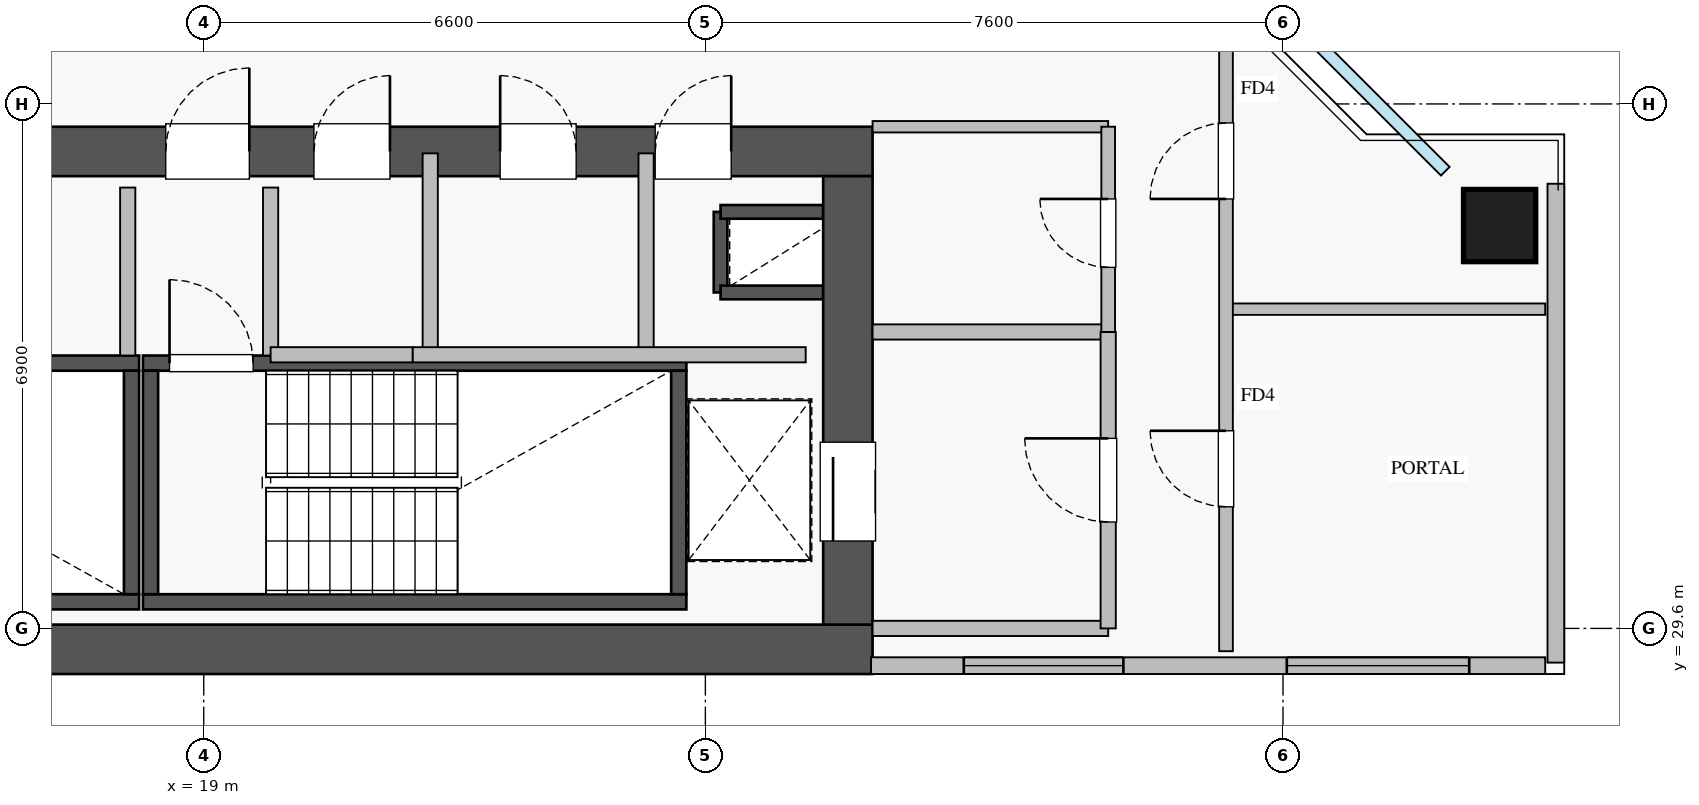
"""IFC4 building model, lengths in metres.
Left out: names, types, materials, properties, quantities, classifications, styles, units other than length and angle.
Written with IfcOpenShell. Run it as: python <this file> out.ifc"""

import sys

from ifc_helpers import new_model, si_unit, direction, frame, frame_2d, origin, origin_2d, place, context, subcontext, project, spatial, rectangle, extrude, source, transform, mapped, element, fill, save


model = new_model("IFC4")
c1 = context("Model", 3, precision=1e-05, world=origin(), true_north=direction((0.0, 1.0)))
c2 = subcontext(c1, "Body", "Model", "MODEL_VIEW")
j1 = project(units=[si_unit("LENGTHUNIT", "METRE"), si_unit("PLANEANGLEUNIT", "RADIAN")], contexts=[c1])
p1 = place(None, origin())
s1 = spatial("IfcSite", under=j1, at=p1, CompositionType="ELEMENT")
p2 = place(p1, origin())
s2 = spatial("IfcBuilding", under=s1, at=p2, CompositionType="ELEMENT")
p3 = place(p2, frame((0.0, 0.0, 169.75)))
s3 = spatial("IfcBuildingStorey", under=s2, at=p3, CompositionType="ELEMENT", Elevation=169.75)
p4 = place(p3, frame((25.8, 34.02, 0.0), z_axis=(0.0, 0.0, 1.0), x_axis=(0.0, 1.0, 0.0)))
e1 = element("IfcWall", 1, at=p4, inside=s3, PredefinedType="SHEAR", context=c2, shape_type="SweptSolid", body=[
    extrude(rectangle(XDim=1.06, YDim=0.18, at=frame_2d((0.53, 0.0))), origin(), (0.0, 0.0, 1.0), 3.0),
])
for number, where, z_axis, x_axis in (
    (2, (25.8, 35.08, 0.0), (0.0, 0.0, 1.0), (1.0, 0.0, 0.0)),
    (3, (25.8, 34.02, 0.0), (0.0, 0.0, 1.0), (1.0, 0.0, 0.0)),
):
    element("IfcWall", number, at=place(p3, frame(where, z_axis=z_axis, x_axis=x_axis)), inside=s3, PredefinedType="SHEAR", context=c2, shape_type="SweptSolid", body=[
        extrude(rectangle(XDim=1.35, YDim=0.18, at=frame_2d((0.675, 0.0))), origin(), (0.0, 0.0, 1.0), 3.0),
    ])
p5 = place(p3, frame((10.85, 29.95, 0.0), z_axis=(0.0, 0.0, 1.0), x_axis=(1.0, 0.0, 0.0)))
e4 = element("IfcWall", 4, at=p5, inside=s3, PredefinedType="SHEAR", context=c2, shape_type="SweptSolid", body=[
    extrude(rectangle(XDim=7.3, YDim=0.2, at=frame_2d((3.65, 0.0))), origin(), (0.0, 0.0, 1.0), 3.25),
])
p6 = place(p3, frame((10.85, 33.09, 0.0), z_axis=(0.0, 0.0, 1.0), x_axis=(1.0, 0.0, 0.0)))
e5 = element("IfcWall", 5, at=p6, inside=s3, PredefinedType="SHEAR", context=c2, shape_type="SweptSolid", body=[
    extrude(rectangle(XDim=7.3, YDim=0.2, at=frame_2d((3.65, 0.0))), origin(), (0.0, 0.0, 1.0), 3.25),
])
p7 = place(p6, frame((0.35, 0.0, 0.0)))
e6 = element("IfcOpeningElement", 6, at=p7, cuts=e5, PredefinedType="OPENING", context=c2, shape_type="SweptSolid", body=[
    extrude(rectangle(XDim=1.1, YDim=2.05, at=frame_2d((0.55, 1.025))), frame((0.0, 0.11, 0.0), z_axis=(0.0, -1.0, 0.0), x_axis=(1.0, 0.0, 0.0)), (0.0, 0.0, 1.0), 0.22),
])
p8 = place(p3, frame((18.05, 30.05, 0.0), z_axis=(0.0, 0.0, 1.0), x_axis=(0.0, 1.0, 0.0)))
e7 = element("IfcWall", 7, at=p8, inside=s3, PredefinedType="SHEAR", context=c2, shape_type="SweptSolid", body=[
    extrude(rectangle(XDim=2.94, YDim=0.2, at=frame_2d((1.47, 0.0))), origin(), (0.0, 0.0, 1.0), 3.25),
])
p9 = place(p3, frame((18.2, 29.95, 0.0), z_axis=(0.0, 0.0, 1.0), x_axis=(1.0, 0.0, 0.0)))
e8 = element("IfcWall", 8, at=p9, inside=s3, PredefinedType="SHEAR", context=c2, shape_type="SweptSolid", body=[
    extrude(rectangle(XDim=7.15, YDim=0.2, at=frame_2d((3.575, 0.0))), origin(), (0.0, 0.0, 1.0), 3.25),
])
p10 = place(p3, frame((18.2, 33.09, 0.0), z_axis=(0.0, 0.0, 1.0), x_axis=(1.0, 0.0, 0.0)))
e9 = element("IfcWall", 9, at=p10, inside=s3, PredefinedType="SHEAR", context=c2, shape_type="SweptSolid", body=[
    extrude(rectangle(XDim=7.15, YDim=0.2, at=frame_2d((3.575, 0.0))), origin(), (0.0, 0.0, 1.0), 3.25),
])
p11 = place(p10, frame((0.35, 0.0, 0.0)))
e10 = element("IfcOpeningElement", 10, at=p11, cuts=e9, PredefinedType="OPENING", context=c2, shape_type="SweptSolid", body=[
    extrude(rectangle(XDim=1.1, YDim=2.05, at=frame_2d((0.55, 1.025))), frame((0.0, 0.11, 0.0), z_axis=(0.0, -1.0, 0.0), x_axis=(1.0, 0.0, 0.0)), (0.0, 0.0, 1.0), 0.22),
])
for number, where, z_axis, x_axis in (
    (11, (18.3, 30.05, 0.0), (0.0, 0.0, 1.0), (0.0, 1.0, 0.0)),
    (12, (25.25, 30.05, 0.0), (0.0, 0.0, 1.0), (0.0, 1.0, 0.0)),
):
    element("IfcWall", number, at=place(p3, frame(where, z_axis=z_axis, x_axis=x_axis)), inside=s3, PredefinedType="SHEAR", context=c2, shape_type="SweptSolid", body=[
        extrude(rectangle(XDim=2.94, YDim=0.2, at=frame_2d((1.47, 0.0))), origin(), (0.0, 0.0, 1.0), 3.25),
    ])
p12 = place(p3, frame((10.2, 29.325, 0.0), z_axis=(0.0, 0.0, 1.0), x_axis=(1.0, 0.0, 0.0)))
e13 = element("IfcWall", 13, at=p12, inside=s3, PredefinedType="SHEAR", context=c2, shape_type="SweptSolid", body=[
    extrude(rectangle(XDim=17.6, YDim=0.65, at=frame_2d((8.8, 0.0))), origin(), (0.0, 0.0, 1.0), 3.25),
])
p13 = place(p3, frame((10.2, 35.875, 0.0), z_axis=(0.0, 0.0, 1.0), x_axis=(1.0, 0.0, 0.0)))
e14 = element("IfcWall", 14, at=p13, inside=s3, PredefinedType="SHEAR", context=c2, shape_type="SweptSolid", body=[
    extrude(rectangle(XDim=17.6, YDim=0.65, at=frame_2d((8.8, 0.0))), origin(), (0.0, 0.0, 1.0), 3.25),
])
p14 = place(p13, frame((1.15, 0.0, 0.0)))
e15 = element("IfcOpeningElement", 15, at=p14, cuts=e14, PredefinedType="OPENING", context=c2, shape_type="SweptSolid", body=[
    extrude(rectangle(XDim=1.1, YDim=2.05, at=frame_2d((0.55, 1.025))), frame((0.0, 0.335, 0.0), z_axis=(0.0, -1.0, 0.0), x_axis=(1.0, 0.0, 0.0)), (0.0, 0.0, 1.0), 0.67),
])
p15 = place(p13, frame((8.3, 0.0, 0.0)))
e16 = element("IfcOpeningElement", 16, at=p15, cuts=e14, PredefinedType="OPENING", context=c2, shape_type="SweptSolid", body=[
    extrude(rectangle(XDim=1.1, YDim=2.05, at=frame_2d((0.55, 1.025))), frame((0.0, 0.335, 0.0), z_axis=(0.0, -1.0, 0.0), x_axis=(1.0, 0.0, 0.0)), (0.0, 0.0, 1.0), 0.67),
])
p16 = place(p13, frame((4.9, 0.0, 0.0)))
e17 = element("IfcOpeningElement", 17, at=p16, cuts=e14, PredefinedType="OPENING", context=c2, shape_type="SweptSolid", body=[
    extrude(rectangle(XDim=1.1, YDim=2.05, at=frame_2d((0.55, 1.025))), frame((0.0, 0.335, 0.0), z_axis=(0.0, -1.0, 0.0), x_axis=(1.0, 0.0, 0.0)), (0.0, 0.0, 1.0), 0.67),
])
p17 = place(p13, frame((14.74, 0.0, 0.0)))
e18 = element("IfcOpeningElement", 18, at=p17, cuts=e14, PredefinedType="OPENING", context=c2, shape_type="SweptSolid", body=[
    extrude(rectangle(XDim=1.0, YDim=2.05, at=frame_2d((0.5, 1.025))), frame((0.0, 0.335, 0.0), z_axis=(0.0, -1.0, 0.0), x_axis=(1.0, 0.0, 0.0)), (0.0, 0.0, 1.0), 0.67),
])
p18 = place(p13, frame((10.25, 0.0, 0.0)))
e19 = element("IfcOpeningElement", 19, at=p18, cuts=e14, PredefinedType="OPENING", context=c2, shape_type="SweptSolid", body=[
    extrude(rectangle(XDim=1.0, YDim=2.05, at=frame_2d((0.5, 1.025))), frame((0.0, 0.335, 0.0), z_axis=(0.0, -1.0, 0.0), x_axis=(1.0, 0.0, 0.0)), (0.0, 0.0, 1.0), 0.67),
])
p19 = place(p13, frame((12.7, 0.0, 0.0)))
e20 = element("IfcOpeningElement", 20, at=p19, cuts=e14, PredefinedType="OPENING", context=c2, shape_type="SweptSolid", body=[
    extrude(rectangle(XDim=1.0, YDim=2.05, at=frame_2d((0.5, 1.025))), frame((0.0, 0.335, 0.0), z_axis=(0.0, -1.0, 0.0), x_axis=(1.0, 0.0, 0.0)), (0.0, 0.0, 1.0), 0.67),
])
p20 = place(p3, frame((27.475, 29.65, 0.0), z_axis=(0.0, 0.0, 1.0), x_axis=(0.0, 1.0, 0.0)))
e21 = element("IfcWall", 21, at=p20, inside=s3, PredefinedType="SHEAR", context=c2, shape_type="SweptSolid", body=[
    extrude(rectangle(XDim=5.9, YDim=0.65, at=frame_2d((2.95, 0.0))), origin(), (0.0, 0.0, 1.0), 3.25),
])
p21 = place(p20, frame((1.1, 0.0, 0.0)))
e22 = element("IfcOpeningElement", 22, at=p21, cuts=e21, PredefinedType="OPENING", context=c2, shape_type="SweptSolid", body=[
    extrude(rectangle(XDim=1.3, YDim=2.05, at=frame_2d((0.65, 1.025))), frame((0.0, 0.335, 0.0), z_axis=(0.0, -1.0, 0.0), x_axis=(1.0, 0.0, 0.0)), (0.0, 0.0, 1.0), 0.67),
])
m1 = source(origin(), c2, "Body", "SweptSolid", [
    extrude(rectangle(XDim=0.95, YDim=0.95, at=origin_2d()), origin(), (0.0, 0.0, 1.0), 3.25),
])
p22 = place(p3, frame((36.05, 34.9, 0.0), z_axis=(0.0, 0.0, 1.0), x_axis=(1.0, 0.0, 0.0)))
e23 = element("IfcColumn", 23, at=p22, inside=s3, PredefinedType="COLUMN", context=c2, shape_type="MappedRepresentation", body=[
    mapped(m1, transform((0.0, 0.0, 0.0), x_axis=(1.0, 0.0, 0.0), y_axis=(0.0, 1.0, 0.0), z_axis=(0.0, 0.0, 1.0), scale=1.0)),
])
p23 = place(p3, frame((27.78, 29.11, 0.0), z_axis=(0.0, 0.0, 1.0), x_axis=(1.0, 0.0, 0.0)))
e24 = element("IfcWall", 24, at=p23, inside=s3, PredefinedType="STANDARD", context=c2, shape_type="SweptSolid", body=[
    extrude(rectangle(XDim=8.87, YDim=0.22, at=frame_2d((4.435, 0.0))), origin(), (0.0, 0.0, 1.0), 2.54),
])
p24 = place(p23, frame((1.22, 0.0, 0.9)))
e25 = element("IfcOpeningElement", 25, at=p24, cuts=e24, PredefinedType="OPENING", context=c2, shape_type="SweptSolid", body=[
    extrude(rectangle(XDim=2.1, YDim=1.46, at=frame_2d((1.05, 0.73))), frame((0.0, 0.12, 0.0), z_axis=(0.0, -1.0, 0.0), x_axis=(1.0, 0.0, 0.0)), (0.0, 0.0, 1.0), 0.24),
])
p25 = place(p23, frame((5.47, 0.0, 0.9)))
e26 = element("IfcOpeningElement", 26, at=p25, cuts=e24, PredefinedType="OPENING", context=c2, shape_type="SweptSolid", body=[
    extrude(rectangle(XDim=2.4, YDim=1.46, at=frame_2d((1.2, 0.73))), frame((0.0, 0.12, 0.0), z_axis=(0.0, -1.0, 0.0), x_axis=(1.0, 0.0, 0.0)), (0.0, 0.0, 1.0), 0.24),
])
p26 = place(p3, frame((36.79, 29.15, 0.0), z_axis=(0.0, 0.0, 1.0), x_axis=(0.0, 1.0, 0.0)))
e27 = element("IfcWall", 27, at=p26, inside=s3, PredefinedType="STANDARD", context=c2, shape_type="SweptSolid", body=[
    extrude(rectangle(XDim=6.3, YDim=0.22, at=frame_2d((3.15, 0.0))), origin(), (0.0, 0.0, 1.0), 2.54),
])
for number, where, z_axis, x_axis in (
    (28, (27.8, 29.6, 0.0), (0.0, 0.0, 1.0), (1.0, 0.0, 0.0)),
    (29, (27.8, 33.5, 0.0), (0.0, 0.0, 1.0), (1.0, 0.0, 0.0)),
):
    element("IfcWall", number, at=place(p3, frame(where, z_axis=z_axis, x_axis=x_axis)), inside=s3, PredefinedType="PARTITIONING", context=c2, shape_type="SweptSolid", body=[
        extrude(rectangle(XDim=3.1, YDim=0.2, at=frame_2d((1.55, 0.0))), origin(), (0.0, 0.0, 1.0), 3.0),
    ])
p27 = place(p3, frame((30.9, 29.6, 0.0), z_axis=(0.0, 0.0, 1.0), x_axis=(0.0, 1.0, 0.0)))
e30 = element("IfcWall", 30, at=p27, inside=s3, PredefinedType="PARTITIONING", context=c2, shape_type="SweptSolid", body=[
    extrude(rectangle(XDim=3.9, YDim=0.2, at=frame_2d((1.95, 0.0))), origin(), (0.0, 0.0, 1.0), 3.0),
])
p28 = place(p27, frame((1.4, 0.0, 0.0)))
e31 = element("IfcOpeningElement", 31, at=p28, cuts=e30, PredefinedType="OPENING", context=c2, shape_type="SweptSolid", body=[
    extrude(rectangle(XDim=1.1, YDim=2.05, at=frame_2d((0.55, 1.025))), frame((0.0, 0.11, 0.0), z_axis=(0.0, -1.0, 0.0), x_axis=(1.0, 0.0, 0.0)), (0.0, 0.0, 1.0), 0.22),
])
for number, where, z_axis, x_axis in (
    (32, (18.0, 33.19, 0.0), (0.0, 0.0, 1.0), (0.0, 1.0, 0.0)),
    (33, (19.88, 33.19, 0.0), (0.0, 0.0, 1.0), (0.0, 1.0, 0.0)),
):
    element("IfcWall", number, at=place(p3, frame(where, z_axis=z_axis, x_axis=x_axis)), inside=s3, PredefinedType="PARTITIONING", context=c2, shape_type="SweptSolid", body=[
        extrude(rectangle(XDim=2.21, YDim=0.2, at=frame_2d((1.105, 0.0))), origin(), (0.0, 0.0, 1.0), 3.0),
    ])
p29 = place(p3, frame((24.82, 33.2, 0.0), z_axis=(0.0, 0.0, 1.0), x_axis=(0.0, 1.0, 0.0)))
e34 = element("IfcWall", 34, at=p29, inside=s3, PredefinedType="PARTITIONING", context=c2, shape_type="SweptSolid", body=[
    extrude(rectangle(XDim=2.65, YDim=0.2, at=frame_2d((1.325, 0.0))), origin(), (0.0, 0.0, 1.0), 3.0),
])
p30 = place(p3, frame((19.88, 33.2, 0.0), z_axis=(0.0, 0.0, 1.0), x_axis=(1.0, 0.0, 0.0)))
e35 = element("IfcWall", 35, at=p30, inside=s3, PredefinedType="PARTITIONING", context=c2, shape_type="SweptSolid", body=[
    extrude(rectangle(XDim=1.87, YDim=0.2, at=frame_2d((0.935, 0.0))), origin(), (0.0, 0.0, 1.0), 3.0),
])
p31 = place(p3, frame((21.98, 33.2, 0.0), z_axis=(0.0, 0.0, 1.0), x_axis=(0.0, 1.0, 0.0)))
e36 = element("IfcWall", 36, at=p31, inside=s3, PredefinedType="PARTITIONING", context=c2, shape_type="SweptSolid", body=[
    extrude(rectangle(XDim=2.65, YDim=0.2, at=frame_2d((1.325, 0.0))), origin(), (0.0, 0.0, 1.0), 3.0),
])
p32 = place(p3, frame((21.75, 33.2, 0.0), z_axis=(0.0, 0.0, 1.0), x_axis=(1.0, 0.0, 0.0)))
e37 = element("IfcWall", 37, at=p32, inside=s3, PredefinedType="PARTITIONING", context=c2, shape_type="SweptSolid", body=[
    extrude(rectangle(XDim=5.17, YDim=0.2, at=frame_2d((2.585, 0.0))), origin(), (0.0, 0.0, 1.0), 3.0),
])
p33 = place(p3, frame((27.8, 36.2, 0.0), z_axis=(0.0, 0.0, 1.0), x_axis=(1.0, 0.0, 0.0)))
e38 = element("IfcWall", 38, at=p33, inside=s3, PredefinedType="PARTITIONING", context=c2, shape_type="SweptSolid", body=[
    extrude(rectangle(XDim=3.1, YDim=0.15, at=frame_2d((1.55, 0.0))), origin(), (0.0, 0.0, 1.0), 3.0),
])
p34 = place(p3, frame((30.9, 33.5, 0.0), z_axis=(0.0, 0.0, 1.0), x_axis=(0.0, 1.0, 0.0)))
e39 = element("IfcWall", 39, at=p34, inside=s3, PredefinedType="PARTITIONING", context=c2, shape_type="SweptSolid", body=[
    extrude(rectangle(XDim=2.7, YDim=0.18, at=frame_2d((1.35, 0.0))), origin(), (0.0, 0.0, 1.0), 2.495),
])
p35 = place(p34, frame((0.85, 0.0, 0.0)))
e40 = element("IfcOpeningElement", 40, at=p35, cuts=e39, PredefinedType="OPENING", context=c2, shape_type="SweptSolid", body=[
    extrude(rectangle(XDim=0.9, YDim=2.05, at=frame_2d((0.45, 1.025))), frame((0.0, 0.1, 0.0), z_axis=(0.0, -1.0, 0.0), x_axis=(1.0, 0.0, 0.0)), (0.0, 0.0, 1.0), 0.2),
])
p36 = place(p3, frame((32.45, 33.8, 0.0), z_axis=(0.0, 0.0, 1.0), x_axis=(1.0, 0.0, 0.0)))
e41 = element("IfcWall", 41, at=p36, inside=s3, PredefinedType="PARTITIONING", context=c2, shape_type="SweptSolid", body=[
    extrude(rectangle(XDim=4.2, YDim=0.15, at=frame_2d((2.1, 0.0))), origin(), (0.0, 0.0, 1.0), 3.0),
])
p37 = place(p3, frame((32.45, 29.3, 0.0), z_axis=(0.0, 0.0, 1.0), x_axis=(0.0, 1.0, 0.0)))
e42 = element("IfcWall", 42, at=p37, inside=s3, PredefinedType="PARTITIONING", context=c2, shape_type="SweptSolid", body=[
    extrude(rectangle(XDim=11.35, YDim=0.18, at=frame_2d((5.675, 0.0))), origin(), (0.0, 0.0, 1.0), 3.0),
])
p38 = place(p37, frame((1.9, 0.0, 0.0)))
e43 = element("IfcOpeningElement", 43, at=p38, cuts=e42, PredefinedType="OPENING", context=c2, shape_type="SweptSolid", body=[
    extrude(rectangle(XDim=1.0, YDim=2.05, at=frame_2d((0.5, 1.025))), frame((0.0, 0.1, 0.0), z_axis=(0.0, -1.0, 0.0), x_axis=(1.0, 0.0, 0.0)), (0.0, 0.0, 1.0), 0.2),
])
p39 = place(p37, frame((5.95, 0.0, 0.0)))
e44 = element("IfcOpeningElement", 44, at=p39, cuts=e42, PredefinedType="OPENING", context=c2, shape_type="SweptSolid", body=[
    extrude(rectangle(XDim=1.0, YDim=2.05, at=frame_2d((0.5, 1.025))), frame((0.0, 0.1, 0.0), z_axis=(0.0, -1.0, 0.0), x_axis=(1.0, 0.0, 0.0)), (0.0, 0.0, 1.0), 0.2),
])
m2 = source(origin(), c2, "Body", "SweptSolid", [
    extrude(rectangle(XDim=2.1, YDim=1.46, at=frame_2d((1.05, 0.73))), frame((0.0, 0.03, 0.0), z_axis=(0.0, -1.0, 0.0), x_axis=(1.0, 0.0, 0.0)), (0.0, 0.0, 1.0), 0.06),
])
p40 = place(p24, origin())
e45 = element("IfcWindow", 45, at=p40, inside=s3, PartitioningType="TRIPLE_PANEL_VERTICAL", PredefinedType="WINDOW", context=c2, shape_type="MappedRepresentation", body=[
    mapped(m2, transform((0.0, 0.0, 0.0), x_axis=(1.0, 0.0, 0.0), y_axis=(0.0, 1.0, 0.0), z_axis=(0.0, 0.0, 1.0), scale=1.0)),
])
fill(e25, e45)
m3 = source(origin(), c2, "Body", "SweptSolid", [
    extrude(rectangle(XDim=2.4, YDim=1.46, at=frame_2d((1.2, 0.73))), frame((0.0, 0.03, 0.0), z_axis=(0.0, -1.0, 0.0), x_axis=(1.0, 0.0, 0.0)), (0.0, 0.0, 1.0), 0.06),
])
p41 = place(p25, origin())
e46 = element("IfcWindow", 46, at=p41, inside=s3, PartitioningType="TRIPLE_PANEL_VERTICAL", PredefinedType="WINDOW", context=c2, shape_type="MappedRepresentation", body=[
    mapped(m3, transform((0.0, 0.0, 0.0), x_axis=(1.0, 0.0, 0.0), y_axis=(0.0, 1.0, 0.0), z_axis=(0.0, 0.0, 1.0), scale=1.0)),
])
fill(e26, e46)
m4 = source(origin(), c2, "Body", "SweptSolid", [
    extrude(rectangle(XDim=1.3, YDim=2.05, at=frame_2d((0.65, 1.025))), frame((0.0, 0.025, 0.0), z_axis=(0.0, -1.0, 0.0), x_axis=(1.0, 0.0, 0.0)), (0.0, 0.0, 1.0), 0.05),
])
p42 = place(p21, origin())
e47 = element("IfcDoor", 47, at=p42, inside=s3, OperationType="SLIDING_TO_LEFT", PredefinedType="DOOR", context=c2, shape_type="MappedRepresentation", body=[
    mapped(m4, transform((0.0, 0.0, 0.0), x_axis=(1.0, 0.0, 0.0), y_axis=(0.0, 1.0, 0.0), z_axis=(0.0, 0.0, 1.0), scale=1.0)),
])
fill(e22, e47)
m5 = source(origin(), c2, "Body", "SweptSolid", [
    extrude(rectangle(XDim=1.1, YDim=2.05, at=frame_2d((0.55, 1.025))), frame((0.0, 0.025, 0.0), z_axis=(0.0, -1.0, 0.0), x_axis=(1.0, 0.0, 0.0)), (0.0, 0.0, 1.0), 0.05),
])
p43 = place(p15, origin())
e48 = element("IfcDoor", 48, at=p43, inside=s3, OperationType="SINGLE_SWING_RIGHT", PredefinedType="DOOR", context=c2, shape_type="MappedRepresentation", body=[
    mapped(m5, transform((0.0, 0.0, 0.0), x_axis=(1.0, 0.0, 0.0), y_axis=(0.0, 1.0, 0.0), z_axis=(0.0, 0.0, 1.0), scale=1.0)),
])
fill(e16, e48)
p44 = place(p11, origin())
e49 = element("IfcDoor", 49, at=p44, inside=s3, OperationType="SINGLE_SWING_LEFT", PredefinedType="DOOR", context=c2, shape_type="MappedRepresentation", body=[
    mapped(m5, transform((0.0, 0.0, 0.0), x_axis=(1.0, 0.0, 0.0), y_axis=(0.0, 1.0, 0.0), z_axis=(0.0, 0.0, 1.0), scale=1.0)),
])
fill(e10, e49)
m6 = source(origin(), c2, "Body", "SweptSolid", [
    extrude(rectangle(XDim=1.0, YDim=2.05, at=frame_2d((0.5, 1.025))), frame((0.0, 0.025, 0.0), z_axis=(0.0, -1.0, 0.0), x_axis=(1.0, 0.0, 0.0)), (0.0, 0.0, 1.0), 0.05),
])
p45 = place(p17, origin())
e50 = element("IfcDoor", 50, at=p45, inside=s3, OperationType="SINGLE_SWING_RIGHT", PredefinedType="DOOR", context=c2, shape_type="MappedRepresentation", body=[
    mapped(m6, transform((0.0, 0.0, 0.0), x_axis=(1.0, 0.0, 0.0), y_axis=(0.0, 1.0, 0.0), z_axis=(0.0, 0.0, 1.0), scale=1.0)),
])
fill(e18, e50)
p46 = place(p18, origin())
e51 = element("IfcDoor", 51, at=p46, inside=s3, OperationType="SINGLE_SWING_RIGHT", PredefinedType="DOOR", context=c2, shape_type="MappedRepresentation", body=[
    mapped(m6, transform((0.0, 0.0, 0.0), x_axis=(1.0, 0.0, 0.0), y_axis=(0.0, 1.0, 0.0), z_axis=(0.0, 0.0, 1.0), scale=1.0)),
])
fill(e19, e51)
p47 = place(p19, origin())
e52 = element("IfcDoor", 52, at=p47, inside=s3, OperationType="SINGLE_SWING_LEFT", PredefinedType="DOOR", context=c2, shape_type="MappedRepresentation", body=[
    mapped(m6, transform((0.0, 0.0, 0.0), x_axis=(1.0, 0.0, 0.0), y_axis=(0.0, 1.0, 0.0), z_axis=(0.0, 0.0, 1.0), scale=1.0)),
])
fill(e20, e52)
p48 = place(p28, origin())
e53 = element("IfcDoor", 53, at=p48, inside=s3, OperationType="SINGLE_SWING_RIGHT", PredefinedType="DOOR", context=c2, shape_type="MappedRepresentation", body=[
    mapped(m5, transform((0.0, 0.0, 0.0), x_axis=(1.0, 0.0, 0.0), y_axis=(0.0, 1.0, 0.0), z_axis=(0.0, 0.0, 1.0), scale=1.0)),
])
fill(e31, e53)
m7 = source(origin(), c2, "Body", "SweptSolid", [
    extrude(rectangle(XDim=0.9, YDim=2.05, at=frame_2d((0.45, 1.025))), frame((0.0, 0.025, 0.0), z_axis=(0.0, -1.0, 0.0), x_axis=(1.0, 0.0, 0.0)), (0.0, 0.0, 1.0), 0.05),
])
p49 = place(p35, origin())
e54 = element("IfcDoor", 54, at=p49, inside=s3, OperationType="SINGLE_SWING_RIGHT", PredefinedType="DOOR", context=c2, shape_type="MappedRepresentation", body=[
    mapped(m7, transform((0.0, 0.0, 0.0), x_axis=(1.0, 0.0, 0.0), y_axis=(0.0, 1.0, 0.0), z_axis=(0.0, 0.0, 1.0), scale=1.0)),
])
fill(e40, e54)
p50 = place(p38, origin())
e55 = element("IfcDoor", 55, at=p50, inside=s3, OperationType="SINGLE_SWING_RIGHT", PredefinedType="DOOR", context=c2, shape_type="MappedRepresentation", body=[
    mapped(m6, transform((0.0, 0.0, 0.0), x_axis=(1.0, 0.0, 0.0), y_axis=(0.0, 1.0, 0.0), z_axis=(0.0, 0.0, 1.0), scale=1.0)),
])
fill(e43, e55)
p51 = place(p39, origin())
e56 = element("IfcDoor", 56, at=p51, inside=s3, OperationType="SINGLE_SWING_LEFT", PredefinedType="DOOR", context=c2, shape_type="MappedRepresentation", body=[
    mapped(m6, transform((0.0, 0.0, 0.0), x_axis=(1.0, 0.0, 0.0), y_axis=(0.0, 1.0, 0.0), z_axis=(0.0, 0.0, 1.0), scale=1.0)),
])
fill(e44, e56)
save(model, sys.argv[1])
